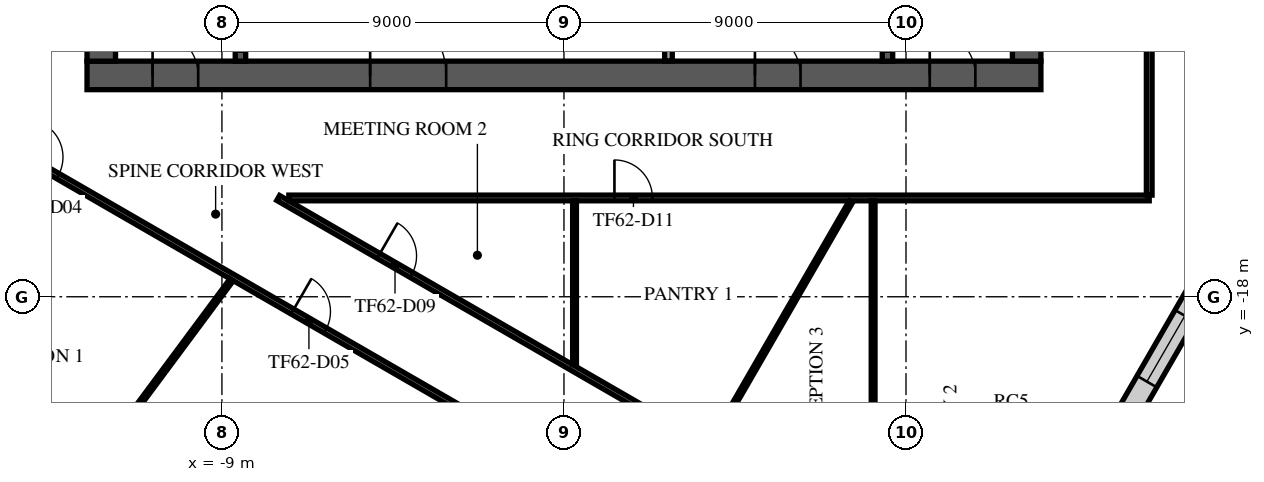
"""IFC4 building model, lengths in metres.
Left out: names, types, materials, properties, quantities, classifications, styles, units other than length and angle.
Written with IfcOpenShell. Run it as: python <this file> out.ifc"""

import sys

from ifc_helpers import new_model, si_unit, direction, frame, frame_2d, origin, place, context, subcontext, project, spatial, rectangle, extrude, element, fill, save


model = new_model("IFC4")
c1 = context("Model", 3, precision=1e-05, world=origin(), true_north=direction((0.0, 1.0)))
c2 = subcontext(c1, "Body", "Model", "MODEL_VIEW")
j1 = project(units=[si_unit("LENGTHUNIT", "METRE"), si_unit("PLANEANGLEUNIT", "RADIAN")], contexts=[c1])
p1 = place(None, origin())
s1 = spatial("IfcSite", under=j1, at=p1, CompositionType="ELEMENT")
p2 = place(p1, origin())
s2 = spatial("IfcBuilding", under=s1, at=p2, CompositionType="ELEMENT")
p3 = place(p2, frame((0.0, 0.0, 262.9)))
s3 = spatial("IfcBuildingStorey", under=s2, at=p3, CompositionType="ELEMENT", Elevation=262.9)
p4 = place(p3, frame((-12.55, -12.175, 0.0), z_axis=(0.0, 0.0, 1.0), x_axis=(1.0, 0.0, 0.0)))
e1 = element("IfcWall", 1, at=p4, inside=s3, PredefinedType="SHEAR", context=c2, shape_type="SweptSolid", body=[
    extrude(rectangle(XDim=25.1, YDim=0.75, at=frame_2d((12.55, 0.0))), origin(), (0.0, 0.0, 1.0), 3.64),
])
p5 = place(p4, frame((7.45, 0.0, 0.0)))
e2 = element("IfcOpeningElement", 2, at=p5, cuts=e1, PredefinedType="OPENING", context=c2, shape_type="SweptSolid", body=[
    extrude(rectangle(XDim=2.0, YDim=2.1, at=frame_2d((1.0, 1.05))), frame((0.0, 0.385, 0.0), z_axis=(0.0, -1.0, 0.0), x_axis=(1.0, 0.0, 0.0)), (0.0, 0.0, 1.0), 0.77),
])
p6 = place(p4, frame((17.575, 0.0, 0.0)))
e3 = element("IfcOpeningElement", 3, at=p6, cuts=e1, PredefinedType="OPENING", context=c2, shape_type="SweptSolid", body=[
    extrude(rectangle(XDim=1.2, YDim=2.1, at=frame_2d((0.6, 1.05))), frame((0.0, 0.385, 0.0), z_axis=(0.0, -1.0, 0.0), x_axis=(1.0, 0.0, 0.0)), (0.0, 0.0, 1.0), 0.77),
])
p7 = place(p4, frame((1.725, 0.0, 0.0)))
e4 = element("IfcOpeningElement", 4, at=p7, cuts=e1, PredefinedType="OPENING", context=c2, shape_type="SweptSolid", body=[
    extrude(rectangle(XDim=1.2, YDim=2.1, at=frame_2d((0.6, 1.05))), frame((0.0, 0.385, 0.0), z_axis=(0.0, -1.0, 0.0), x_axis=(1.0, 0.0, 0.0)), (0.0, 0.0, 1.0), 0.77),
])
p8 = place(p4, frame((22.175, 0.0, 0.0)))
e5 = element("IfcOpeningElement", 5, at=p8, cuts=e1, PredefinedType="OPENING", context=c2, shape_type="SweptSolid", body=[
    extrude(rectangle(XDim=1.2, YDim=2.1, at=frame_2d((0.6, 1.05))), frame((0.0, 0.385, 0.0), z_axis=(0.0, -1.0, 0.0), x_axis=(1.0, 0.0, 0.0)), (0.0, 0.0, 1.0), 0.77),
])
p9 = place(p3, frame((12.175, -11.8, 0.0), z_axis=(0.0, 0.0, 1.0), x_axis=(0.0, 1.0, 0.0)))
e6 = element("IfcWall", 6, at=p9, inside=s3, PredefinedType="SHEAR", context=c2, shape_type="SweptSolid", body=[
    extrude(rectangle(XDim=23.6, YDim=0.75, at=frame_2d((11.8, 0.0))), origin(), (0.0, 0.0, 1.0), 3.64),
])
p10 = place(p9, frame((10.6, 0.0, 0.0)))
e7 = element("IfcOpeningElement", 7, at=p10, cuts=e6, PredefinedType="OPENING", context=c2, shape_type="SweptSolid", body=[
    extrude(rectangle(XDim=2.4, YDim=2.4, at=frame_2d((1.2, 1.2))), frame((0.0, 0.385, 0.0), z_axis=(0.0, -1.0, 0.0), x_axis=(1.0, 0.0, 0.0)), (0.0, 0.0, 1.0), 0.77),
])
p11 = place(p3, frame((-12.175, -11.8, 0.0), z_axis=(0.0, 0.0, 1.0), x_axis=(0.0, 1.0, 0.0)))
e8 = element("IfcWall", 8, at=p11, inside=s3, PredefinedType="SHEAR", context=c2, shape_type="SweptSolid", body=[
    extrude(rectangle(XDim=23.6, YDim=0.75, at=frame_2d((11.8, 0.0))), origin(), (0.0, 0.0, 1.0), 3.64),
])
p12 = place(p11, frame((10.6, 0.0, 0.0)))
e9 = element("IfcOpeningElement", 9, at=p12, cuts=e8, PredefinedType="OPENING", context=c2, shape_type="SweptSolid", body=[
    extrude(rectangle(XDim=2.4, YDim=2.4, at=frame_2d((1.2, 1.2))), frame((0.0, 0.385, 0.0), z_axis=(0.0, -1.0, 0.0), x_axis=(1.0, 0.0, 0.0)), (0.0, 0.0, 1.0), 0.77),
])
p13 = place(p3, frame((-8.512, -4.55, 0.0), z_axis=(0.0, 0.0, 1.0), x_axis=(0.0, -1.0, 0.0)))
e10 = element("IfcWall", 10, at=p13, inside=s3, PredefinedType="SOLIDWALL", context=c2, shape_type="SweptSolid", body=[
    extrude(rectangle(XDim=7.25, YDim=0.275, at=frame_2d((3.625, 0.0))), origin(), (0.0, 0.0, 1.0), 3.64),
])
p14 = place(p13, frame((6.0, 0.0, 0.0)))
e11 = element("IfcOpeningElement", 11, at=p14, cuts=e10, PredefinedType="OPENING", context=c2, shape_type="SweptSolid", body=[
    extrude(rectangle(XDim=1.0, YDim=2.1, at=frame_2d((0.5, 1.05))), frame((0.0, 0.147, 0.0), z_axis=(0.0, -1.0, 0.0), x_axis=(1.0, 0.0, 0.0)), (0.0, 0.0, 1.0), 0.295),
])
p15 = place(p3, frame((8.512, -4.55, 0.0), z_axis=(0.0, 0.0, 1.0), x_axis=(0.0, -1.0, 0.0)))
e12 = element("IfcWall", 12, at=p15, inside=s3, PredefinedType="SOLIDWALL", context=c2, shape_type="SweptSolid", body=[
    extrude(rectangle(XDim=7.25, YDim=0.275, at=frame_2d((3.625, 0.0))), origin(), (0.0, 0.0, 1.0), 3.64),
])
p16 = place(p15, frame((6.0, 0.0, 0.0)))
e13 = element("IfcOpeningElement", 13, at=p16, cuts=e12, PredefinedType="OPENING", context=c2, shape_type="SweptSolid", body=[
    extrude(rectangle(XDim=1.0, YDim=2.1, at=frame_2d((0.5, 1.05))), frame((0.0, 0.147, 0.0), z_axis=(0.0, -1.0, 0.0), x_axis=(1.0, 0.0, 0.0)), (0.0, 0.0, 1.0), 0.295),
])
p17 = place(p3, frame((2.75, -11.795, 0.0), z_axis=(0.0, 0.0, 1.0), x_axis=(0.0, 1.0, 0.0)))
e14 = element("IfcWall", 14, at=p17, inside=s3, PredefinedType="PARTITIONING", context=c2, shape_type="SweptSolid", body=[
    extrude(rectangle(XDim=2.99, YDim=0.2, at=frame_2d((1.495, 0.0))), origin(), (0.0, 0.0, 1.0), 3.64),
])
p18 = place(p3, frame((-30.476, -16.699, 0.0), z_axis=(0.0, 0.0, 1.0), x_axis=(0.866027969777, -0.499995555543, 0.0)))
e15 = element("IfcWall", 15, at=p18, inside=s3, PredefinedType="STANDARD", context=c2, shape_type="SweptSolid", body=[
    extrude(rectangle(XDim=36.086, YDim=0.6, at=frame_2d((18.043, 0.0))), origin(), (0.0, 0.0, 1.0), 3.64),
])
p19 = place(p18, frame((1.205, 0.0, 0.9)))
e16 = element("IfcOpeningElement", 16, at=p19, cuts=e15, PredefinedType="OPENING", context=c2, shape_type="SweptSolid", body=[
    extrude(rectangle(XDim=2.1, YDim=2.1, at=frame_2d((1.05, 1.05))), frame((0.0, 0.31, 0.0), z_axis=(0.0, -1.0, 0.0), x_axis=(1.0, 0.0, 0.0)), (0.0, 0.0, 1.0), 0.62),
])
p20 = place(p18, frame((5.716, 0.0, 0.9)))
e17 = element("IfcOpeningElement", 17, at=p20, cuts=e15, PredefinedType="OPENING", context=c2, shape_type="SweptSolid", body=[
    extrude(rectangle(XDim=2.1, YDim=2.1, at=frame_2d((1.05, 1.05))), frame((0.0, 0.31, 0.0), z_axis=(0.0, -1.0, 0.0), x_axis=(1.0, 0.0, 0.0)), (0.0, 0.0, 1.0), 0.62),
])
p21 = place(p18, frame((10.227, 0.0, 0.9)))
e18 = element("IfcOpeningElement", 18, at=p21, cuts=e15, PredefinedType="OPENING", context=c2, shape_type="SweptSolid", body=[
    extrude(rectangle(XDim=2.1, YDim=2.1, at=frame_2d((1.05, 1.05))), frame((0.0, 0.31, 0.0), z_axis=(0.0, -1.0, 0.0), x_axis=(1.0, 0.0, 0.0)), (0.0, 0.0, 1.0), 0.62),
])
p22 = place(p18, frame((14.738, 0.0, 0.9)))
e19 = element("IfcOpeningElement", 19, at=p22, cuts=e15, PredefinedType="OPENING", context=c2, shape_type="SweptSolid", body=[
    extrude(rectangle(XDim=2.1, YDim=2.1, at=frame_2d((1.05, 1.05))), frame((0.0, 0.31, 0.0), z_axis=(0.0, -1.0, 0.0), x_axis=(1.0, 0.0, 0.0)), (0.0, 0.0, 1.0), 0.62),
])
p23 = place(p18, frame((19.249, 0.0, 0.9)))
e20 = element("IfcOpeningElement", 20, at=p23, cuts=e15, PredefinedType="OPENING", context=c2, shape_type="SweptSolid", body=[
    extrude(rectangle(XDim=2.1, YDim=2.1, at=frame_2d((1.05, 1.05))), frame((0.0, 0.31, 0.0), z_axis=(0.0, -1.0, 0.0), x_axis=(1.0, 0.0, 0.0)), (0.0, 0.0, 1.0), 0.62),
])
p24 = place(p18, frame((23.759, 0.0, 0.9)))
e21 = element("IfcOpeningElement", 21, at=p24, cuts=e15, PredefinedType="OPENING", context=c2, shape_type="SweptSolid", body=[
    extrude(rectangle(XDim=2.1, YDim=2.1, at=frame_2d((1.05, 1.05))), frame((0.0, 0.31, 0.0), z_axis=(0.0, -1.0, 0.0), x_axis=(1.0, 0.0, 0.0)), (0.0, 0.0, 1.0), 0.62),
])
p25 = place(p18, frame((28.27, 0.0, 0.9)))
e22 = element("IfcOpeningElement", 22, at=p25, cuts=e15, PredefinedType="OPENING", context=c2, shape_type="SweptSolid", body=[
    extrude(rectangle(XDim=2.1, YDim=2.1, at=frame_2d((1.05, 1.05))), frame((0.0, 0.31, 0.0), z_axis=(0.0, -1.0, 0.0), x_axis=(1.0, 0.0, 0.0)), (0.0, 0.0, 1.0), 0.62),
])
p26 = place(p18, frame((32.781, 0.0, 0.9)))
e23 = element("IfcOpeningElement", 23, at=p26, cuts=e15, PredefinedType="OPENING", context=c2, shape_type="SweptSolid", body=[
    extrude(rectangle(XDim=2.1, YDim=2.1, at=frame_2d((1.05, 1.05))), frame((0.0, 0.31, 0.0), z_axis=(0.0, -1.0, 0.0), x_axis=(1.0, 0.0, 0.0)), (0.0, 0.0, 1.0), 0.62),
])
p27 = place(p3, frame((8.094, -32.782, 0.0), z_axis=(0.0, 0.0, 1.0), x_axis=(0.499997945818, 0.866026589763, 0.0)))
e24 = element("IfcWall", 24, at=p27, inside=s3, PredefinedType="STANDARD", context=c2, shape_type="SweptSolid", body=[
    extrude(rectangle(XDim=48.686, YDim=0.6, at=frame_2d((24.343, 0.0))), origin(), (0.0, 0.0, 1.0), 3.64),
])
p28 = place(p27, frame((1.213, 0.0, 0.9)))
e25 = element("IfcOpeningElement", 25, at=p28, cuts=e24, PredefinedType="OPENING", context=c2, shape_type="SweptSolid", body=[
    extrude(rectangle(XDim=2.0, YDim=2.1, at=frame_2d((1.0, 1.05))), frame((0.0, 0.31, 0.0), z_axis=(0.0, -1.0, 0.0), x_axis=(1.0, 0.0, 0.0)), (0.0, 0.0, 1.0), 0.62),
])
p29 = place(p27, frame((5.639, 0.0, 0.9)))
e26 = element("IfcOpeningElement", 26, at=p29, cuts=e24, PredefinedType="OPENING", context=c2, shape_type="SweptSolid", body=[
    extrude(rectangle(XDim=2.0, YDim=2.1, at=frame_2d((1.0, 1.05))), frame((0.0, 0.31, 0.0), z_axis=(0.0, -1.0, 0.0), x_axis=(1.0, 0.0, 0.0)), (0.0, 0.0, 1.0), 0.62),
])
p30 = place(p27, frame((10.065, 0.0, 0.9)))
e27 = element("IfcOpeningElement", 27, at=p30, cuts=e24, PredefinedType="OPENING", context=c2, shape_type="SweptSolid", body=[
    extrude(rectangle(XDim=2.0, YDim=2.1, at=frame_2d((1.0, 1.05))), frame((0.0, 0.31, 0.0), z_axis=(0.0, -1.0, 0.0), x_axis=(1.0, 0.0, 0.0)), (0.0, 0.0, 1.0), 0.62),
])
p31 = place(p27, frame((14.491, 0.0, 0.9)))
e28 = element("IfcOpeningElement", 28, at=p31, cuts=e24, PredefinedType="OPENING", context=c2, shape_type="SweptSolid", body=[
    extrude(rectangle(XDim=2.0, YDim=2.1, at=frame_2d((1.0, 1.05))), frame((0.0, 0.31, 0.0), z_axis=(0.0, -1.0, 0.0), x_axis=(1.0, 0.0, 0.0)), (0.0, 0.0, 1.0), 0.62),
])
p32 = place(p27, frame((18.917, 0.0, 0.9)))
e29 = element("IfcOpeningElement", 29, at=p32, cuts=e24, PredefinedType="OPENING", context=c2, shape_type="SweptSolid", body=[
    extrude(rectangle(XDim=2.0, YDim=2.1, at=frame_2d((1.0, 1.05))), frame((0.0, 0.31, 0.0), z_axis=(0.0, -1.0, 0.0), x_axis=(1.0, 0.0, 0.0)), (0.0, 0.0, 1.0), 0.62),
])
p33 = place(p27, frame((23.343, 0.0, 0.9)))
e30 = element("IfcOpeningElement", 30, at=p33, cuts=e24, PredefinedType="OPENING", context=c2, shape_type="SweptSolid", body=[
    extrude(rectangle(XDim=2.0, YDim=2.1, at=frame_2d((1.0, 1.05))), frame((0.0, 0.31, 0.0), z_axis=(0.0, -1.0, 0.0), x_axis=(1.0, 0.0, 0.0)), (0.0, 0.0, 1.0), 0.62),
])
p34 = place(p27, frame((27.769, 0.0, 0.9)))
e31 = element("IfcOpeningElement", 31, at=p34, cuts=e24, PredefinedType="OPENING", context=c2, shape_type="SweptSolid", body=[
    extrude(rectangle(XDim=2.0, YDim=2.1, at=frame_2d((1.0, 1.05))), frame((0.0, 0.31, 0.0), z_axis=(0.0, -1.0, 0.0), x_axis=(1.0, 0.0, 0.0)), (0.0, 0.0, 1.0), 0.62),
])
p35 = place(p27, frame((32.195, 0.0, 0.9)))
e32 = element("IfcOpeningElement", 32, at=p35, cuts=e24, PredefinedType="OPENING", context=c2, shape_type="SweptSolid", body=[
    extrude(rectangle(XDim=2.0, YDim=2.1, at=frame_2d((1.0, 1.05))), frame((0.0, 0.31, 0.0), z_axis=(0.0, -1.0, 0.0), x_axis=(1.0, 0.0, 0.0)), (0.0, 0.0, 1.0), 0.62),
])
p36 = place(p27, frame((36.621, 0.0, 0.9)))
e33 = element("IfcOpeningElement", 33, at=p36, cuts=e24, PredefinedType="OPENING", context=c2, shape_type="SweptSolid", body=[
    extrude(rectangle(XDim=2.0, YDim=2.1, at=frame_2d((1.0, 1.05))), frame((0.0, 0.31, 0.0), z_axis=(0.0, -1.0, 0.0), x_axis=(1.0, 0.0, 0.0)), (0.0, 0.0, 1.0), 0.62),
])
p37 = place(p27, frame((41.047, 0.0, 0.9)))
e34 = element("IfcOpeningElement", 34, at=p37, cuts=e24, PredefinedType="OPENING", context=c2, shape_type="SweptSolid", body=[
    extrude(rectangle(XDim=2.0, YDim=2.1, at=frame_2d((1.0, 1.05))), frame((0.0, 0.31, 0.0), z_axis=(0.0, -1.0, 0.0), x_axis=(1.0, 0.0, 0.0)), (0.0, 0.0, 1.0), 0.62),
])
p38 = place(p27, frame((45.473, 0.0, 0.9)))
e35 = element("IfcOpeningElement", 35, at=p38, cuts=e24, PredefinedType="OPENING", context=c2, shape_type="SweptSolid", body=[
    extrude(rectangle(XDim=2.0, YDim=2.1, at=frame_2d((1.0, 1.05))), frame((0.0, 0.31, 0.0), z_axis=(0.0, -1.0, 0.0), x_axis=(1.0, 0.0, 0.0)), (0.0, 0.0, 1.0), 0.62),
])
p39 = place(p3, frame((-26.744, -7.073, 0.0), z_axis=(0.0, 0.0, 1.0), x_axis=(0.866020890374, -0.500007817374, 0.0)))
e36 = element("IfcWall", 36, at=p39, inside=s3, PredefinedType="PARTITIONING", context=c2, shape_type="SweptSolid", body=[
    extrude(rectangle(XDim=39.324, YDim=0.15, at=frame_2d((19.662, 0.0))), origin(), (0.0, 0.0, 1.0), 3.04),
])
p40 = place(p39, frame((14.505, 0.0, 0.0)))
e37 = element("IfcOpeningElement", 37, at=p40, cuts=e36, PredefinedType="OPENING", context=c2, shape_type="SweptSolid", body=[
    extrude(rectangle(XDim=1.0, YDim=2.1, at=frame_2d((0.5, 1.05))), frame((0.0, 0.085, 0.0), z_axis=(0.0, -1.0, 0.0), x_axis=(1.0, 0.0, 0.0)), (0.0, 0.0, 1.0), 0.17),
])
p41 = place(p39, frame((22.632, 0.0, 0.0)))
e38 = element("IfcOpeningElement", 38, at=p41, cuts=e36, PredefinedType="OPENING", context=c2, shape_type="SweptSolid", body=[
    extrude(rectangle(XDim=1.0, YDim=2.1, at=frame_2d((0.5, 1.05))), frame((0.0, 0.085, 0.0), z_axis=(0.0, -1.0, 0.0), x_axis=(1.0, 0.0, 0.0)), (0.0, 0.0, 1.0), 0.17),
])
p42 = place(p39, frame((36.852, 0.0, 0.0)))
e39 = element("IfcOpeningElement", 39, at=p42, cuts=e36, PredefinedType="OPENING", context=c2, shape_type="SweptSolid", body=[
    extrude(rectangle(XDim=1.8, YDim=2.1, at=frame_2d((0.9, 1.05))), frame((0.0, 0.085, 0.0), z_axis=(0.0, -1.0, 0.0), x_axis=(1.0, 0.0, 0.0)), (0.0, 0.0, 1.0), 0.17),
])
p43 = place(p39, frame((29.852, 0.0, 0.0)))
e40 = element("IfcOpeningElement", 40, at=p43, cuts=e36, PredefinedType="OPENING", context=c2, shape_type="SweptSolid", body=[
    extrude(rectangle(XDim=1.0, YDim=2.1, at=frame_2d((0.5, 1.05))), frame((0.0, 0.085, 0.0), z_axis=(0.0, -1.0, 0.0), x_axis=(1.0, 0.0, 0.0)), (0.0, 0.0, 1.0), 0.17),
])
p44 = place(p3, frame((-7.52, -15.4, 0.0), z_axis=(0.0, 0.0, 1.0), x_axis=(0.86602460502, -0.500001383498, 0.0)))
e41 = element("IfcWall", 41, at=p44, inside=s3, PredefinedType="PARTITIONING", context=c2, shape_type="SweptSolid", body=[
    extrude(rectangle(XDim=18.512, YDim=0.15, at=frame_2d((9.256, 0.0))), origin(), (0.0, 0.0, 1.0), 3.04),
])
p45 = place(p44, frame((3.05, 0.0, 0.0)))
e42 = element("IfcOpeningElement", 42, at=p45, cuts=e41, PredefinedType="OPENING", context=c2, shape_type="SweptSolid", body=[
    extrude(rectangle(XDim=1.0, YDim=2.1, at=frame_2d((0.5, 1.05))), frame((0.0, 0.085, 0.0), z_axis=(0.0, -1.0, 0.0), x_axis=(1.0, 0.0, 0.0)), (0.0, 0.0, 1.0), 0.17),
])
p46 = place(p44, frame((13.65, 0.0, 0.0)))
e43 = element("IfcOpeningElement", 43, at=p46, cuts=e41, PredefinedType="OPENING", context=c2, shape_type="SweptSolid", body=[
    extrude(rectangle(XDim=1.0, YDim=2.1, at=frame_2d((0.5, 1.05))), frame((0.0, 0.085, 0.0), z_axis=(0.0, -1.0, 0.0), x_axis=(1.0, 0.0, 0.0)), (0.0, 0.0, 1.0), 0.17),
])
p47 = place(p3, frame((-7.24, -15.4, 0.0), z_axis=(0.0, 0.0, 1.0), x_axis=(1.0, 0.0, 0.0)))
e44 = element("IfcWall", 44, at=p47, inside=s3, PredefinedType="PARTITIONING", context=c2, shape_type="SweptSolid", body=[
    extrude(rectangle(XDim=22.64, YDim=0.15, at=frame_2d((11.32, 0.0))), origin(), (0.0, 0.0, 1.0), 3.24),
])
p48 = place(p47, frame((8.568, 0.0, 0.0)))
e45 = element("IfcOpeningElement", 45, at=p48, cuts=e44, PredefinedType="OPENING", context=c2, shape_type="SweptSolid", body=[
    extrude(rectangle(XDim=1.0, YDim=2.1, at=frame_2d((0.5, 1.05))), frame((0.0, 0.085, 0.0), z_axis=(0.0, -1.0, 0.0), x_axis=(1.0, 0.0, 0.0)), (0.0, 0.0, 1.0), 0.17),
])
p49 = place(p3, frame((15.4, -15.325, 0.0), z_axis=(0.0, 0.0, 1.0), x_axis=(0.0, 1.0, 0.0)))
e46 = element("IfcWall", 46, at=p49, inside=s3, PredefinedType="PARTITIONING", context=c2, shape_type="SweptSolid", body=[
    extrude(rectangle(XDim=26.175, YDim=0.15, at=frame_2d((13.087, 0.0))), origin(), (0.0, 0.0, 1.0), 3.24),
])
p50 = place(p49, frame((15.312, 0.0, 0.0)))
e47 = element("IfcOpeningElement", 47, at=p50, cuts=e46, PredefinedType="OPENING", context=c2, shape_type="SweptSolid", body=[
    extrude(rectangle(XDim=1.0, YDim=2.1, at=frame_2d((0.5, 1.05))), frame((0.0, 0.085, 0.0), z_axis=(0.0, -1.0, 0.0), x_axis=(1.0, 0.0, 0.0)), (0.0, 0.0, 1.0), 0.17),
])
p51 = place(p49, frame((4.619, 0.0, 0.0)))
e48 = element("IfcOpeningElement", 48, at=p51, cuts=e46, PredefinedType="OPENING", context=c2, shape_type="SweptSolid", body=[
    extrude(rectangle(XDim=1.0, YDim=2.1, at=frame_2d((0.5, 1.05))), frame((0.0, 0.085, 0.0), z_axis=(0.0, -1.0, 0.0), x_axis=(1.0, 0.0, 0.0)), (0.0, 0.0, 1.0), 0.17),
])
p52 = place(p3, frame((-14.64, -25.493, 0.0), z_axis=(0.0, 0.0, 1.0), x_axis=(0.596096620962, 0.802912709127, 0.0)))
e49 = element("IfcWall", 49, at=p52, inside=s3, PredefinedType="PARTITIONING", context=c2, shape_type="SweptSolid", body=[
    extrude(rectangle(XDim=9.885, YDim=0.1, at=frame_2d((4.943, 0.0))), origin(), (0.0, 0.0, 1.0), 3.04),
])
p53 = place(p3, frame((0.278, -19.787, 0.0), z_axis=(0.0, 0.0, 1.0), x_axis=(0.0, 1.0, 0.0)))
e50 = element("IfcWall", 50, at=p53, inside=s3, PredefinedType="PARTITIONING", context=c2, shape_type="SweptSolid", body=[
    extrude(rectangle(XDim=4.312, YDim=0.1, at=frame_2d((2.156, 0.0))), origin(), (0.0, 0.0, 1.0), 3.24),
])
p54 = place(p3, frame((3.863, -21.885, 0.0), z_axis=(0.0, 0.0, 1.0), x_axis=(0.500038702166, 0.866003057926, 0.0)))
e51 = element("IfcWall", 51, at=p54, inside=s3, PredefinedType="PARTITIONING", context=c2, shape_type="SweptSolid", body=[
    extrude(rectangle(XDim=7.373, YDim=0.1, at=frame_2d((3.687, 0.0))), origin(), (0.0, 0.0, 1.0), 3.24),
])
p55 = place(p3, frame((8.135, -24.323, 0.0), z_axis=(0.0, 0.0, 1.0), x_axis=(0.0, 1.0, 0.0)))
e52 = element("IfcWall", 52, at=p55, inside=s3, PredefinedType="PARTITIONING", context=c2, shape_type="SweptSolid", body=[
    extrude(rectangle(XDim=8.847, YDim=0.1, at=frame_2d((4.424, 0.0))), origin(), (0.0, 0.0, 1.0), 3.24),
])
p56 = place(p5, origin())
e53 = element("IfcDoor", 53, at=p56, inside=s3, OperationType="SINGLE_SWING_LEFT", PredefinedType="DOOR", context=c2, shape_type="SweptSolid", body=[
    extrude(rectangle(XDim=2.0, YDim=2.1, at=frame_2d((1.0, 1.05))), frame((0.0, 0.025, 0.0), z_axis=(0.0, -1.0, 0.0), x_axis=(1.0, 0.0, 0.0)), (0.0, 0.0, 1.0), 0.05),
])
fill(e2, e53)
p57 = place(p6, origin())
e54 = element("IfcDoor", 54, at=p57, inside=s3, OperationType="SINGLE_SWING_LEFT", PredefinedType="DOOR", context=c2, shape_type="SweptSolid", body=[
    extrude(rectangle(XDim=1.2, YDim=2.1, at=frame_2d((0.6, 1.05))), frame((0.0, 0.025, 0.0), z_axis=(0.0, -1.0, 0.0), x_axis=(1.0, 0.0, 0.0)), (0.0, 0.0, 1.0), 0.05),
])
fill(e3, e54)
p58 = place(p7, origin())
e55 = element("IfcDoor", 55, at=p58, inside=s3, OperationType="SINGLE_SWING_LEFT", PredefinedType="DOOR", context=c2, shape_type="SweptSolid", body=[
    extrude(rectangle(XDim=1.2, YDim=2.1, at=frame_2d((0.6, 1.05))), frame((0.0, 0.025, 0.0), z_axis=(0.0, -1.0, 0.0), x_axis=(1.0, 0.0, 0.0)), (0.0, 0.0, 1.0), 0.05),
])
fill(e4, e55)
p59 = place(p8, origin())
e56 = element("IfcDoor", 56, at=p59, inside=s3, OperationType="SINGLE_SWING_LEFT", PredefinedType="DOOR", context=c2, shape_type="SweptSolid", body=[
    extrude(rectangle(XDim=1.2, YDim=2.1, at=frame_2d((0.6, 1.05))), frame((0.0, 0.025, 0.0), z_axis=(0.0, -1.0, 0.0), x_axis=(1.0, 0.0, 0.0)), (0.0, 0.0, 1.0), 0.05),
])
fill(e5, e56)
p60 = place(p31, origin())
e57 = element("IfcWindow", 57, at=p60, inside=s3, PartitioningType="SINGLE_PANEL", PredefinedType="WINDOW", context=c2, shape_type="SweptSolid", body=[
    extrude(rectangle(XDim=2.0, YDim=2.1, at=frame_2d((1.0, 1.05))), frame((0.0, 0.03, 0.0), z_axis=(0.0, -1.0, 0.0), x_axis=(1.0, 0.0, 0.0)), (0.0, 0.0, 1.0), 0.06),
])
fill(e28, e57)
p61 = place(p40, frame((1.0, 0.0, 0.0), z_axis=(0.0, 0.0, 1.0), x_axis=(-1.0, 0.0, 0.0)))
e58 = element("IfcDoor", 58, at=p61, inside=s3, OperationType="SINGLE_SWING_LEFT", PredefinedType="DOOR", context=c2, shape_type="SweptSolid", body=[
    extrude(rectangle(XDim=1.0, YDim=2.1, at=frame_2d((0.5, 1.05))), frame((0.0, 0.025, 0.0), z_axis=(0.0, -1.0, 0.0), x_axis=(1.0, 0.0, 0.0)), (0.0, 0.0, 1.0), 0.05),
])
fill(e37, e58)
p62 = place(p41, frame((1.0, 0.0, 0.0), z_axis=(0.0, 0.0, 1.0), x_axis=(-1.0, 0.0, 0.0)))
e59 = element("IfcDoor", 59, at=p62, inside=s3, OperationType="SINGLE_SWING_RIGHT", PredefinedType="DOOR", context=c2, shape_type="SweptSolid", body=[
    extrude(rectangle(XDim=1.0, YDim=2.1, at=frame_2d((0.5, 1.05))), frame((0.0, 0.025, 0.0), z_axis=(0.0, -1.0, 0.0), x_axis=(1.0, 0.0, 0.0)), (0.0, 0.0, 1.0), 0.05),
])
fill(e38, e59)
p63 = place(p45, origin())
e60 = element("IfcDoor", 60, at=p63, inside=s3, OperationType="SINGLE_SWING_LEFT", PredefinedType="DOOR", context=c2, shape_type="SweptSolid", body=[
    extrude(rectangle(XDim=1.0, YDim=2.1, at=frame_2d((0.5, 1.05))), frame((0.0, 0.025, 0.0), z_axis=(0.0, -1.0, 0.0), x_axis=(1.0, 0.0, 0.0)), (0.0, 0.0, 1.0), 0.05),
])
fill(e42, e60)
p64 = place(p48, frame((1.0, 0.0, 0.0), z_axis=(0.0, 0.0, 1.0), x_axis=(-1.0, 0.0, 0.0)))
e61 = element("IfcDoor", 61, at=p64, inside=s3, OperationType="SINGLE_SWING_RIGHT", PredefinedType="DOOR", context=c2, shape_type="SweptSolid", body=[
    extrude(rectangle(XDim=1.0, YDim=2.1, at=frame_2d((0.5, 1.05))), frame((0.0, 0.025, 0.0), z_axis=(0.0, -1.0, 0.0), x_axis=(1.0, 0.0, 0.0)), (0.0, 0.0, 1.0), 0.05),
])
fill(e45, e61)
save(model, sys.argv[1])
